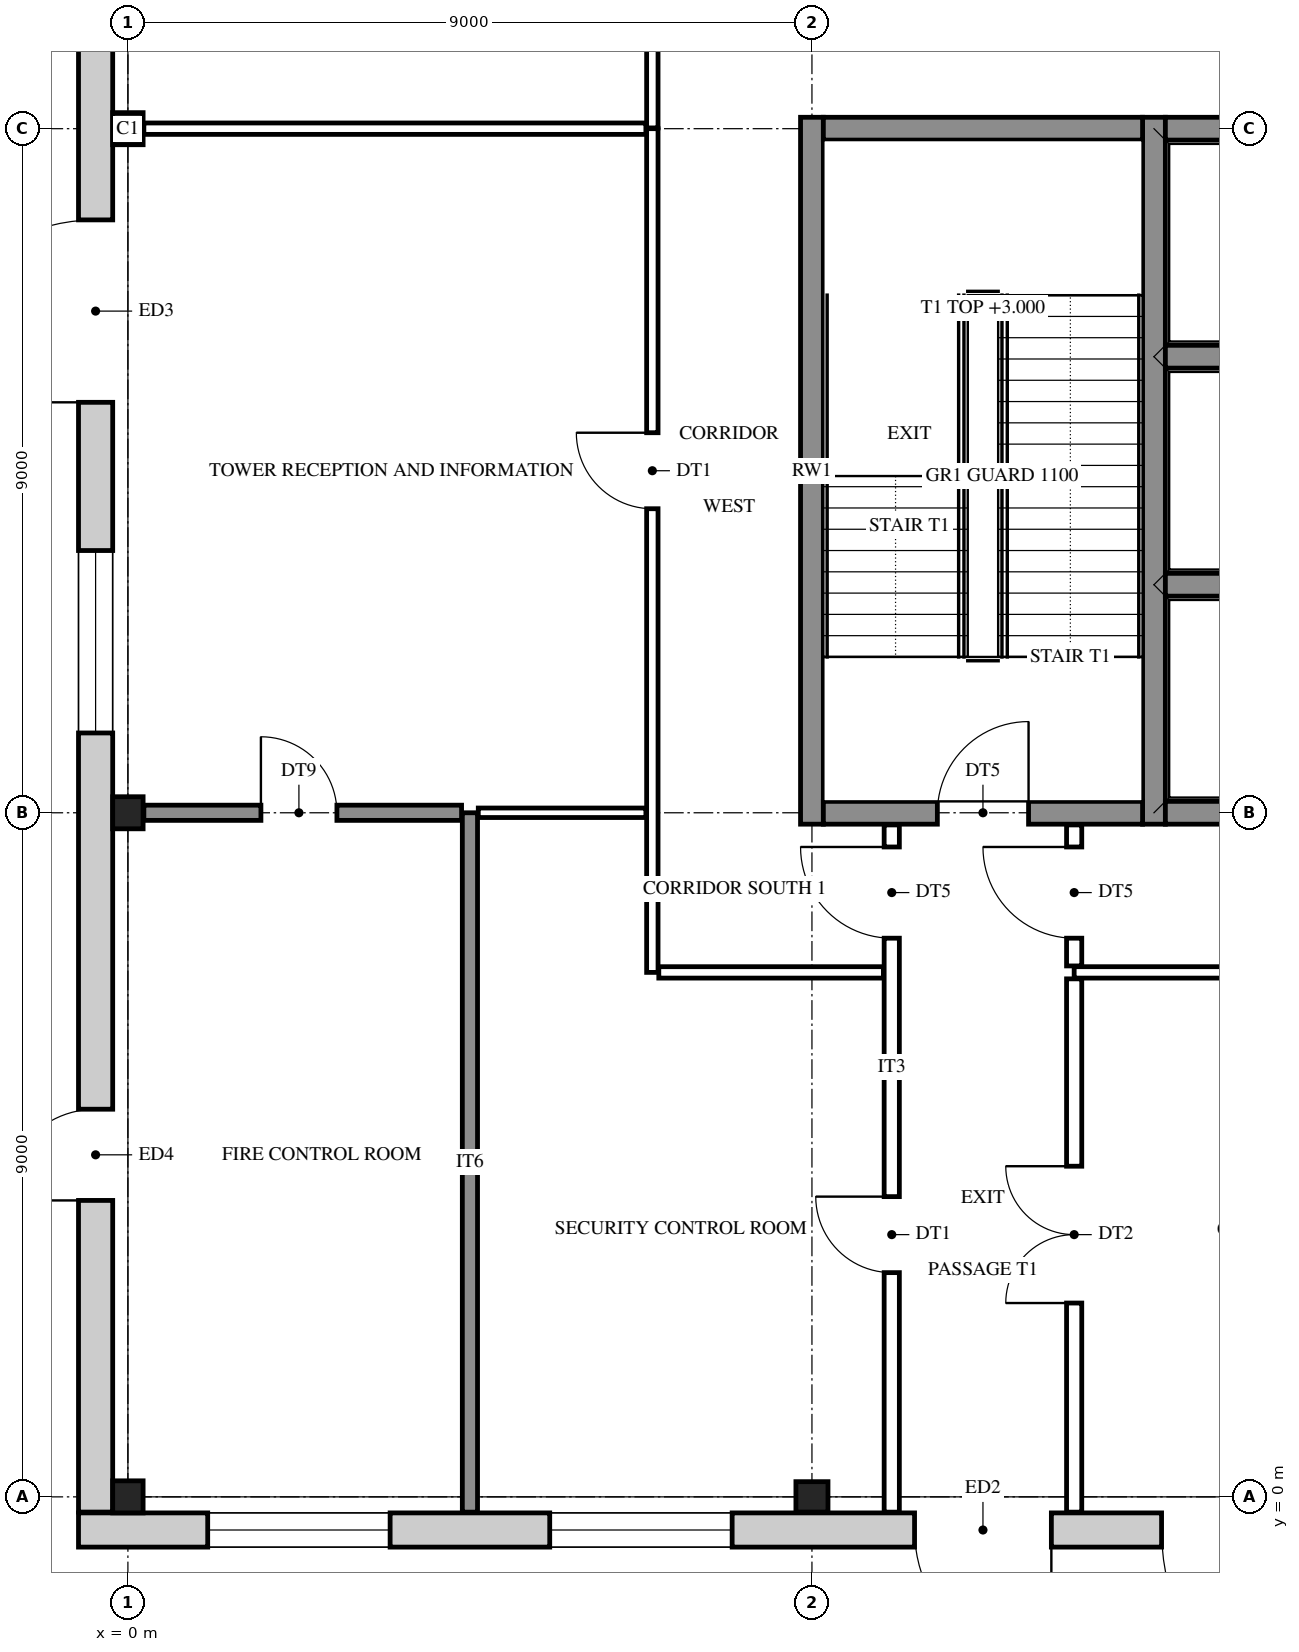
"""IFC4 building model, lengths in metres.
Left out: names, types, materials, properties, quantities, classifications, styles, units other than length and angle.
Written with IfcOpenShell. Run it as: python <this file> out.ifc"""

import sys

from ifc_helpers import new_model, si_unit, direction, frame, frame_2d, origin, origin_2d, place, context, subcontext, project, spatial, rectangle, i_section, extrude, element, fill, save


model = new_model("IFC4")
c1 = context("Model", 3, precision=1e-05, world=origin(), true_north=direction((0.0, 1.0)))
c2 = subcontext(c1, "Body", "Model", "MODEL_VIEW")
j1 = project(units=[si_unit("LENGTHUNIT", "METRE"), si_unit("PLANEANGLEUNIT", "RADIAN")], contexts=[c1])
p1 = place(None, origin())
s1 = spatial("IfcSite", under=j1, at=p1, CompositionType="ELEMENT")
p2 = place(p1, origin())
s2 = spatial("IfcBuilding", under=s1, at=p2, CompositionType="ELEMENT")
p3 = place(p2, origin())
s3 = spatial("IfcBuildingStorey", under=s2, at=p3, CompositionType="ELEMENT", Elevation=0.0)
for number, where, z_axis, x_axis in (
    (1, (0.0, 0.0, 0.0), (0.0, 0.0, 1.0), (1.0, 0.0, 0.0)),
    (2, (0.0, 9.0, 0.0), (0.0, 0.0, 1.0), (1.0, 0.0, 0.0)),
    (3, (0.0, 18.0, 0.0), (0.0, 0.0, 1.0), (1.0, 0.0, 0.0)),
    (4, (9.0, 0.0, 0.0), (0.0, 0.0, 1.0), (0.0, 1.0, 0.0)),
):
    element("IfcColumn", number, at=place(p3, frame(where, z_axis=z_axis, x_axis=x_axis)), inside=s3, PredefinedType="COLUMN", context=c2, shape_type="SweptSolid", body=[
        extrude(i_section(OverallWidth=0.4, OverallDepth=0.422, WebThickness=0.028, FlangeThickness=0.036, at=origin_2d()), origin(), (0.0, 0.0, 1.0), 6.0),
    ])
for number, where, z_axis, x_axis in (
    (5, (9.0, 8.85, 0.0), (0.0, 0.0, 1.0), (0.0, 1.0, 0.0)),
    (6, (13.5, 8.85, 0.0), (0.0, 0.0, 1.0), (0.0, 1.0, 0.0)),
):
    element("IfcWall", number, at=place(p3, frame(where, z_axis=z_axis, x_axis=x_axis)), inside=s3, PredefinedType="SHEAR", context=c2, shape_type="SweptSolid", body=[
        extrude(rectangle(XDim=9.3, YDim=0.3, at=frame_2d((4.65, 0.0))), origin(), (0.0, 0.0, 1.0), 6.0),
    ])
p4 = place(p3, frame((9.15, 9.0, 0.0), z_axis=(0.0, 0.0, 1.0), x_axis=(1.0, 0.0, 0.0)))
e7 = element("IfcWall", 7, at=p4, inside=s3, PredefinedType="SHEAR", context=c2, shape_type="SweptSolid", body=[
    extrude(rectangle(XDim=4.2, YDim=0.3, at=frame_2d((2.1, 0.0))), origin(), (0.0, 0.0, 1.0), 6.0),
])
p5 = place(p4, frame((1.5, 0.0, 0.0)))
e8 = element("IfcOpeningElement", 8, at=p5, cuts=e7, PredefinedType="OPENING", context=c2, shape_type="SweptSolid", body=[
    extrude(rectangle(XDim=1.2, YDim=2.1, at=frame_2d((0.6, 1.05))), frame((0.0, 0.16, 0.0), z_axis=(0.0, -1.0, 0.0), x_axis=(1.0, 0.0, 0.0)), (0.0, 0.0, 1.0), 0.32),
])
for number, where, z_axis, x_axis in (
    (9, (13.65, 9.0, 0.0), (0.0, 0.0, 1.0), (1.0, 0.0, 0.0)),
    (10, (13.65, 12.0, 0.0), (0.0, 0.0, 1.0), (1.0, 0.0, 0.0)),
    (11, (13.65, 15.0, 0.0), (0.0, 0.0, 1.0), (1.0, 0.0, 0.0)),
):
    element("IfcWall", number, at=place(p3, frame(where, z_axis=z_axis, x_axis=x_axis)), inside=s3, PredefinedType="SHEAR", context=c2, shape_type="SweptSolid", body=[
        extrude(rectangle(XDim=2.7, YDim=0.3, at=frame_2d((1.35, 0.0))), origin(), (0.0, 0.0, 1.0), 6.0),
    ])
p6 = place(p3, frame((9.15, 18.0, 0.0), z_axis=(0.0, 0.0, 1.0), x_axis=(1.0, 0.0, 0.0)))
e12 = element("IfcWall", 12, at=p6, inside=s3, PredefinedType="SHEAR", context=c2, shape_type="SweptSolid", body=[
    extrude(rectangle(XDim=4.2, YDim=0.3, at=frame_2d((2.1, 0.0))), origin(), (0.0, 0.0, 1.0), 6.0),
])
p7 = place(p3, frame((13.65, 18.0, 0.0), z_axis=(0.0, 0.0, 1.0), x_axis=(1.0, 0.0, 0.0)))
e13 = element("IfcWall", 13, at=p7, inside=s3, PredefinedType="SHEAR", context=c2, shape_type="SweptSolid", body=[
    extrude(rectangle(XDim=2.7, YDim=0.3, at=frame_2d((1.35, 0.0))), origin(), (0.0, 0.0, 1.0), 6.0),
])
p8 = place(p3, frame((32.15, -0.436, 0.0), z_axis=(0.0, 0.0, 1.0), x_axis=(-1.0, 0.0, 0.0)))
e14 = element("IfcWall", 14, at=p8, inside=s3, PredefinedType="STANDARD", context=c2, shape_type="SweptSolid", body=[
    extrude(rectangle(XDim=32.8, YDim=0.45, at=frame_2d((16.4, 0.0))), origin(), (0.0, 0.0, 1.0), 6.0),
])
p9 = place(p8, frame((15.55, 0.0, 0.012)))
e15 = element("IfcOpeningElement", 15, at=p9, cuts=e14, PredefinedType="OPENING", context=c2, shape_type="SweptSolid", body=[
    extrude(rectangle(XDim=3.0, YDim=2.4, at=frame_2d((1.5, 1.2))), frame((0.0, 0.235, 0.0), z_axis=(0.0, -1.0, 0.0), x_axis=(1.0, 0.0, 0.0)), (0.0, 0.0, 1.0), 0.47),
])
p10 = place(p8, frame((20.0, 0.0, 0.012)))
e16 = element("IfcOpeningElement", 16, at=p10, cuts=e14, PredefinedType="OPENING", context=c2, shape_type="SweptSolid", body=[
    extrude(rectangle(XDim=1.8, YDim=2.4, at=frame_2d((0.9, 1.2))), frame((0.0, 0.235, 0.0), z_axis=(0.0, -1.0, 0.0), x_axis=(1.0, 0.0, 0.0)), (0.0, 0.0, 1.0), 0.47),
])
p11 = place(p8, frame((6.5, 0.0, 0.012)))
e17 = element("IfcOpeningElement", 17, at=p11, cuts=e14, PredefinedType="OPENING", context=c2, shape_type="SweptSolid", body=[
    extrude(rectangle(XDim=1.8, YDim=2.4, at=frame_2d((0.9, 1.2))), frame((0.0, 0.235, 0.0), z_axis=(0.0, -1.0, 0.0), x_axis=(1.0, 0.0, 0.0)), (0.0, 0.0, 1.0), 0.47),
])
p12 = place(p8, frame((28.7, 0.0, 0.9)))
e18 = element("IfcOpeningElement", 18, at=p12, cuts=e14, PredefinedType="OPENING", context=c2, shape_type="SweptSolid", body=[
    extrude(rectangle(XDim=2.4, YDim=3.5, at=frame_2d((1.2, 1.75))), frame((0.0, 0.235, 0.0), z_axis=(0.0, -1.0, 0.0), x_axis=(1.0, 0.0, 0.0)), (0.0, 0.0, 1.0), 0.47),
])
p13 = place(p8, frame((24.2, 0.0, 0.9)))
e19 = element("IfcOpeningElement", 19, at=p13, cuts=e14, PredefinedType="OPENING", context=c2, shape_type="SweptSolid", body=[
    extrude(rectangle(XDim=2.4, YDim=3.5, at=frame_2d((1.2, 1.75))), frame((0.0, 0.235, 0.0), z_axis=(0.0, -1.0, 0.0), x_axis=(1.0, 0.0, 0.0)), (0.0, 0.0, 1.0), 0.47),
])
p14 = place(p8, frame((10.7, 0.0, 0.9)))
e20 = element("IfcOpeningElement", 20, at=p14, cuts=e14, PredefinedType="OPENING", context=c2, shape_type="SweptSolid", body=[
    extrude(rectangle(XDim=2.4, YDim=3.5, at=frame_2d((1.2, 1.75))), frame((0.0, 0.235, 0.0), z_axis=(0.0, -1.0, 0.0), x_axis=(1.0, 0.0, 0.0)), (0.0, 0.0, 1.0), 0.47),
])
p15 = place(p8, frame((1.7, 0.0, 0.9)))
e21 = element("IfcOpeningElement", 21, at=p15, cuts=e14, PredefinedType="OPENING", context=c2, shape_type="SweptSolid", body=[
    extrude(rectangle(XDim=2.4, YDim=3.5, at=frame_2d((1.2, 1.75))), frame((0.0, 0.235, 0.0), z_axis=(0.0, -1.0, 0.0), x_axis=(1.0, 0.0, 0.0)), (0.0, 0.0, 1.0), 0.47),
])
p16 = place(p3, frame((-0.425, -0.2, 0.0), z_axis=(0.0, 0.0, 1.0), x_axis=(0.0, 1.0, 0.0)))
e22 = element("IfcWall", 22, at=p16, inside=s3, PredefinedType="STANDARD", context=c2, shape_type="SweptSolid", body=[
    extrude(rectangle(XDim=27.4, YDim=0.45, at=frame_2d((13.7, 0.0))), origin(), (0.0, 0.0, 1.0), 6.0),
])
p17 = place(p16, frame((14.6, 0.0, 0.012)))
e23 = element("IfcOpeningElement", 23, at=p17, cuts=e22, PredefinedType="OPENING", context=c2, shape_type="SweptSolid", body=[
    extrude(rectangle(XDim=2.4, YDim=2.4, at=frame_2d((1.2, 1.2))), frame((0.0, 0.235, 0.0), z_axis=(0.0, -1.0, 0.0), x_axis=(1.0, 0.0, 0.0)), (0.0, 0.0, 1.0), 0.47),
])
p18 = place(p16, frame((4.1, 0.0, 0.012)))
e24 = element("IfcOpeningElement", 24, at=p18, cuts=e22, PredefinedType="OPENING", context=c2, shape_type="SweptSolid", body=[
    extrude(rectangle(XDim=1.2, YDim=2.4, at=frame_2d((0.6, 1.2))), frame((0.0, 0.235, 0.0), z_axis=(0.0, -1.0, 0.0), x_axis=(1.0, 0.0, 0.0)), (0.0, 0.0, 1.0), 0.47),
])
p19 = place(p16, frame((10.25, 0.0, 0.9)))
e25 = element("IfcOpeningElement", 25, at=p19, cuts=e22, PredefinedType="OPENING", context=c2, shape_type="SweptSolid", body=[
    extrude(rectangle(XDim=2.4, YDim=3.5, at=frame_2d((1.2, 1.75))), frame((0.0, 0.235, 0.0), z_axis=(0.0, -1.0, 0.0), x_axis=(1.0, 0.0, 0.0)), (0.0, 0.0, 1.0), 0.47),
])
p20 = place(p3, frame((4.5, -0.201, 0.0), z_axis=(0.0, 0.0, 1.0), x_axis=(0.0, 1.0, 0.0)))
e26 = element("IfcWall", 26, at=p20, inside=s3, PredefinedType="PARTITIONING", context=c2, shape_type="SweptSolid", body=[
    extrude(rectangle(XDim=9.201, YDim=0.2, at=frame_2d((4.601, 0.0))), origin(), (0.0, 0.0, 1.0), 5.218),
])
p21 = place(p3, frame((6.9, 6.9, 0.0), z_axis=(0.0, 0.0, 1.0), x_axis=(0.0, 1.0, 0.0)))
e27 = element("IfcWall", 27, at=p21, inside=s3, PredefinedType="PARTITIONING", context=c2, shape_type="SweptSolid", body=[
    extrude(rectangle(XDim=11.1, YDim=0.15, at=frame_2d((5.55, 0.0))), origin(), (0.0, 0.0, 1.0), 5.218),
])
p22 = place(p21, frame((6.1, 0.0, 0.0)))
e28 = element("IfcOpeningElement", 28, at=p22, cuts=e27, PredefinedType="OPENING", context=c2, shape_type="SweptSolid", body=[
    extrude(rectangle(XDim=1.0, YDim=2.1, at=frame_2d((0.5, 1.05))), frame((0.0, 0.085, 0.0), z_axis=(0.0, -1.0, 0.0), x_axis=(1.0, 0.0, 0.0)), (0.0, 0.0, 1.0), 0.17),
])
p23 = place(p3, frame((6.9, 18.01, 0.0), z_axis=(0.0, 0.0, 1.0), x_axis=(0.0, 1.0, 0.0)))
e29 = element("IfcWall", 29, at=p23, inside=s3, PredefinedType="PARTITIONING", context=c2, shape_type="SweptSolid", body=[
    extrude(rectangle(XDim=2.005, YDim=0.15, at=frame_2d((1.002, 0.0))), origin(), (0.0, 0.0, 1.0), 5.218),
])
p24 = place(p3, frame((10.05, -0.201, 0.0), z_axis=(0.0, 0.0, 1.0), x_axis=(0.0, 1.0, 0.0)))
e30 = element("IfcWall", 30, at=p24, inside=s3, PredefinedType="PARTITIONING", context=c2, shape_type="SweptSolid", body=[
    extrude(rectangle(XDim=9.041, YDim=0.2, at=frame_2d((4.521, 0.0))), origin(), (0.0, 0.0, 1.0), 5.218),
])
p25 = place(p24, frame((7.551, 0.0, 0.0)))
e31 = element("IfcOpeningElement", 31, at=p25, cuts=e30, PredefinedType="OPENING", context=c2, shape_type="SweptSolid", body=[
    extrude(rectangle(XDim=1.2, YDim=2.1, at=frame_2d((0.6, 1.05))), frame((0.0, 0.11, 0.0), z_axis=(0.0, -1.0, 0.0), x_axis=(1.0, 0.0, 0.0)), (0.0, 0.0, 1.0), 0.22),
])
p26 = place(p24, frame((3.151, 0.0, 0.0)))
e32 = element("IfcOpeningElement", 32, at=p26, cuts=e30, PredefinedType="OPENING", context=c2, shape_type="SweptSolid", body=[
    extrude(rectangle(XDim=1.0, YDim=2.1, at=frame_2d((0.5, 1.05))), frame((0.0, 0.11, 0.0), z_axis=(0.0, -1.0, 0.0), x_axis=(1.0, 0.0, 0.0)), (0.0, 0.0, 1.0), 0.22),
])
p27 = place(p3, frame((12.45, -0.201, 0.0), z_axis=(0.0, 0.0, 1.0), x_axis=(0.0, 1.0, 0.0)))
e33 = element("IfcWall", 33, at=p27, inside=s3, PredefinedType="PARTITIONING", context=c2, shape_type="SweptSolid", body=[
    extrude(rectangle(XDim=7.016, YDim=0.2, at=frame_2d((3.508, 0.0))), origin(), (0.0, 0.0, 1.0), 5.218),
])
p28 = place(p27, frame((2.751, 0.0, 0.0)))
e34 = element("IfcOpeningElement", 34, at=p28, cuts=e33, PredefinedType="OPENING", context=c2, shape_type="SweptSolid", body=[
    extrude(rectangle(XDim=1.8, YDim=2.1, at=frame_2d((0.9, 1.05))), frame((0.0, 0.11, 0.0), z_axis=(0.0, -1.0, 0.0), x_axis=(1.0, 0.0, 0.0)), (0.0, 0.0, 1.0), 0.22),
])
p29 = place(p3, frame((12.45, 6.985, 0.0), z_axis=(0.0, 0.0, 1.0), x_axis=(0.0, 1.0, 0.0)))
e35 = element("IfcWall", 35, at=p29, inside=s3, PredefinedType="PARTITIONING", context=c2, shape_type="SweptSolid", body=[
    extrude(rectangle(XDim=1.855, YDim=0.2, at=frame_2d((0.927, 0.0))), origin(), (0.0, 0.0, 1.0), 5.218),
])
p30 = place(p29, frame((0.365, 0.0, 0.0)))
e36 = element("IfcOpeningElement", 36, at=p30, cuts=e35, PredefinedType="OPENING", context=c2, shape_type="SweptSolid", body=[
    extrude(rectangle(XDim=1.2, YDim=2.1, at=frame_2d((0.6, 1.05))), frame((0.0, 0.11, 0.0), z_axis=(0.0, -1.0, 0.0), x_axis=(1.0, 0.0, 0.0)), (0.0, 0.0, 1.0), 0.22),
])
p31 = place(p3, frame((6.985, 6.9, 0.0), z_axis=(0.0, 0.0, 1.0), x_axis=(1.0, 0.0, 0.0)))
e37 = element("IfcWall", 37, at=p31, inside=s3, PredefinedType="PARTITIONING", context=c2, shape_type="SweptSolid", body=[
    extrude(rectangle(XDim=2.955, YDim=0.15, at=frame_2d((1.478, 0.0))), origin(), (0.0, 0.0, 1.0), 5.218),
])
p32 = place(p3, frame((12.45, 6.9, 0.0), z_axis=(0.0, 0.0, 1.0), x_axis=(1.0, 0.0, 0.0)))
e38 = element("IfcWall", 38, at=p32, inside=s3, PredefinedType="PARTITIONING", context=c2, shape_type="SweptSolid", body=[
    extrude(rectangle(XDim=11.1, YDim=0.15, at=frame_2d((5.55, 0.0))), origin(), (0.0, 0.0, 1.0), 5.218),
])
p33 = place(p3, frame((0.21, 9.0, 0.0), z_axis=(0.0, 0.0, 1.0), x_axis=(1.0, 0.0, 0.0)))
e39 = element("IfcWall", 39, at=p33, inside=s3, PredefinedType="PARTITIONING", context=c2, shape_type="SweptSolid", body=[
    extrude(rectangle(XDim=4.18, YDim=0.2, at=frame_2d((2.09, 0.0))), origin(), (0.0, 0.0, 1.0), 5.218),
])
p34 = place(p33, frame((1.54, 0.0, 0.0)))
e40 = element("IfcOpeningElement", 40, at=p34, cuts=e39, PredefinedType="OPENING", context=c2, shape_type="SweptSolid", body=[
    extrude(rectangle(XDim=1.0, YDim=2.1, at=frame_2d((0.5, 1.05))), frame((0.0, 0.11, 0.0), z_axis=(0.0, -1.0, 0.0), x_axis=(1.0, 0.0, 0.0)), (0.0, 0.0, 1.0), 0.22),
])
p35 = place(p3, frame((4.61, 9.0, 0.0), z_axis=(0.0, 0.0, 1.0), x_axis=(1.0, 0.0, 0.0)))
e41 = element("IfcWall", 41, at=p35, inside=s3, PredefinedType="PARTITIONING", context=c2, shape_type="SweptSolid", body=[
    extrude(rectangle(XDim=2.205, YDim=0.125, at=frame_2d((1.103, 0.0))), origin(), (0.0, 0.0, 1.0), 5.218),
])
p36 = place(p3, frame((0.21, 18.0, 0.0), z_axis=(0.0, 0.0, 1.0), x_axis=(1.0, 0.0, 0.0)))
e42 = element("IfcWall", 42, at=p36, inside=s3, PredefinedType="PARTITIONING", context=c2, shape_type="SweptSolid", body=[
    extrude(rectangle(XDim=6.605, YDim=0.15, at=frame_2d((3.302, 0.0))), origin(), (0.0, 0.0, 1.0), 5.218),
])
p37 = place(p9, origin())
e43 = element("IfcDoor", 43, at=p37, inside=s3, OperationType="DOUBLE_DOOR_DOUBLE_SWING", PredefinedType="DOOR", context=c2, shape_type="SweptSolid", body=[
    extrude(rectangle(XDim=3.0, YDim=2.4, at=frame_2d((1.5, 1.2))), frame((0.0, 0.025, 0.0), z_axis=(0.0, -1.0, 0.0), x_axis=(1.0, 0.0, 0.0)), (0.0, 0.0, 1.0), 0.05),
])
fill(e15, e43)
p38 = place(p10, origin())
e44 = element("IfcDoor", 44, at=p38, inside=s3, OperationType="DOUBLE_DOOR_DOUBLE_SWING", PredefinedType="DOOR", context=c2, shape_type="SweptSolid", body=[
    extrude(rectangle(XDim=1.8, YDim=2.4, at=frame_2d((0.9, 1.2))), frame((0.0, 0.025, 0.0), z_axis=(0.0, -1.0, 0.0), x_axis=(1.0, 0.0, 0.0)), (0.0, 0.0, 1.0), 0.05),
])
fill(e16, e44)
p39 = place(p12, origin())
e45 = element("IfcWindow", 45, at=p39, inside=s3, PartitioningType="SINGLE_PANEL", PredefinedType="WINDOW", context=c2, shape_type="SweptSolid", body=[
    extrude(rectangle(XDim=2.4, YDim=3.5, at=frame_2d((1.2, 1.75))), frame((0.0, 0.03, 0.0), z_axis=(0.0, -1.0, 0.0), x_axis=(1.0, 0.0, 0.0)), (0.0, 0.0, 1.0), 0.06),
])
fill(e18, e45)
p40 = place(p13, origin())
e46 = element("IfcWindow", 46, at=p40, inside=s3, PartitioningType="SINGLE_PANEL", PredefinedType="WINDOW", context=c2, shape_type="SweptSolid", body=[
    extrude(rectangle(XDim=2.4, YDim=3.5, at=frame_2d((1.2, 1.75))), frame((0.0, 0.03, 0.0), z_axis=(0.0, -1.0, 0.0), x_axis=(1.0, 0.0, 0.0)), (0.0, 0.0, 1.0), 0.06),
])
fill(e19, e46)
p41 = place(p17, origin())
e47 = element("IfcDoor", 47, at=p41, inside=s3, OperationType="DOUBLE_DOOR_DOUBLE_SWING", PredefinedType="DOOR", context=c2, shape_type="SweptSolid", body=[
    extrude(rectangle(XDim=2.4, YDim=2.4, at=frame_2d((1.2, 1.2))), frame((0.0, 0.025, 0.0), z_axis=(0.0, -1.0, 0.0), x_axis=(1.0, 0.0, 0.0)), (0.0, 0.0, 1.0), 0.05),
])
fill(e23, e47)
p42 = place(p18, origin())
e48 = element("IfcDoor", 48, at=p42, inside=s3, OperationType="DOUBLE_DOOR_DOUBLE_SWING", PredefinedType="DOOR", context=c2, shape_type="SweptSolid", body=[
    extrude(rectangle(XDim=1.2, YDim=2.4, at=frame_2d((0.6, 1.2))), frame((0.0, 0.025, 0.0), z_axis=(0.0, -1.0, 0.0), x_axis=(1.0, 0.0, 0.0)), (0.0, 0.0, 1.0), 0.05),
])
fill(e24, e48)
p43 = place(p19, origin())
e49 = element("IfcWindow", 49, at=p43, inside=s3, PartitioningType="SINGLE_PANEL", PredefinedType="WINDOW", context=c2, shape_type="SweptSolid", body=[
    extrude(rectangle(XDim=2.4, YDim=3.5, at=frame_2d((1.2, 1.75))), frame((0.0, 0.03, 0.0), z_axis=(0.0, -1.0, 0.0), x_axis=(1.0, 0.0, 0.0)), (0.0, 0.0, 1.0), 0.06),
])
fill(e25, e49)
p44 = place(p5, origin())
e50 = element("IfcDoor", 50, at=p44, inside=s3, OperationType="SINGLE_SWING_RIGHT", PredefinedType="DOOR", context=c2, shape_type="SweptSolid", body=[
    extrude(rectangle(XDim=1.2, YDim=2.1, at=frame_2d((0.6, 1.05))), frame((0.0, 0.025, 0.0), z_axis=(0.0, -1.0, 0.0), x_axis=(1.0, 0.0, 0.0)), (0.0, 0.0, 1.0), 0.05),
])
fill(e8, e50)
p45 = place(p25, frame((1.2, 0.0, 0.0), z_axis=(0.0, 0.0, 1.0), x_axis=(-1.0, 0.0, 0.0)))
e51 = element("IfcDoor", 51, at=p45, inside=s3, OperationType="SINGLE_SWING_RIGHT", PredefinedType="DOOR", context=c2, shape_type="SweptSolid", body=[
    extrude(rectangle(XDim=1.2, YDim=2.1, at=frame_2d((0.6, 1.05))), frame((0.0, 0.025, 0.0), z_axis=(0.0, -1.0, 0.0), x_axis=(1.0, 0.0, 0.0)), (0.0, 0.0, 1.0), 0.05),
])
fill(e31, e51)
p46 = place(p30, origin())
e52 = element("IfcDoor", 52, at=p46, inside=s3, OperationType="SINGLE_SWING_RIGHT", PredefinedType="DOOR", context=c2, shape_type="SweptSolid", body=[
    extrude(rectangle(XDim=1.2, YDim=2.1, at=frame_2d((0.6, 1.05))), frame((0.0, 0.025, 0.0), z_axis=(0.0, -1.0, 0.0), x_axis=(1.0, 0.0, 0.0)), (0.0, 0.0, 1.0), 0.05),
])
fill(e36, e52)
p47 = place(p34, origin())
e53 = element("IfcDoor", 53, at=p47, inside=s3, OperationType="SINGLE_SWING_LEFT", PredefinedType="DOOR", context=c2, shape_type="SweptSolid", body=[
    extrude(rectangle(XDim=1.0, YDim=2.1, at=frame_2d((0.5, 1.05))), frame((0.0, 0.025, 0.0), z_axis=(0.0, -1.0, 0.0), x_axis=(1.0, 0.0, 0.0)), (0.0, 0.0, 1.0), 0.05),
])
fill(e40, e53)
p48 = place(p26, origin())
e54 = element("IfcDoor", 54, at=p48, inside=s3, OperationType="SINGLE_SWING_RIGHT", PredefinedType="DOOR", context=c2, shape_type="SweptSolid", body=[
    extrude(rectangle(XDim=1.0, YDim=2.1, at=frame_2d((0.5, 1.05))), frame((0.0, 0.025, 0.0), z_axis=(0.0, -1.0, 0.0), x_axis=(1.0, 0.0, 0.0)), (0.0, 0.0, 1.0), 0.05),
])
fill(e32, e54)
p49 = place(p28, frame((1.8, 0.0, 0.0), z_axis=(0.0, 0.0, 1.0), x_axis=(-1.0, 0.0, 0.0)))
e55 = element("IfcDoor", 55, at=p49, inside=s3, OperationType="DOUBLE_DOOR_SINGLE_SWING", PredefinedType="DOOR", context=c2, shape_type="SweptSolid", body=[
    extrude(rectangle(XDim=1.8, YDim=2.1, at=frame_2d((0.9, 1.05))), frame((0.0, 0.025, 0.0), z_axis=(0.0, -1.0, 0.0), x_axis=(1.0, 0.0, 0.0)), (0.0, 0.0, 1.0), 0.05),
])
fill(e34, e55)
p50 = place(p22, origin())
e56 = element("IfcDoor", 56, at=p50, inside=s3, OperationType="SINGLE_SWING_RIGHT", PredefinedType="DOOR", context=c2, shape_type="SweptSolid", body=[
    extrude(rectangle(XDim=1.0, YDim=2.1, at=frame_2d((0.5, 1.05))), frame((0.0, 0.025, 0.0), z_axis=(0.0, -1.0, 0.0), x_axis=(1.0, 0.0, 0.0)), (0.0, 0.0, 1.0), 0.05),
])
fill(e28, e56)
save(model, sys.argv[1])
